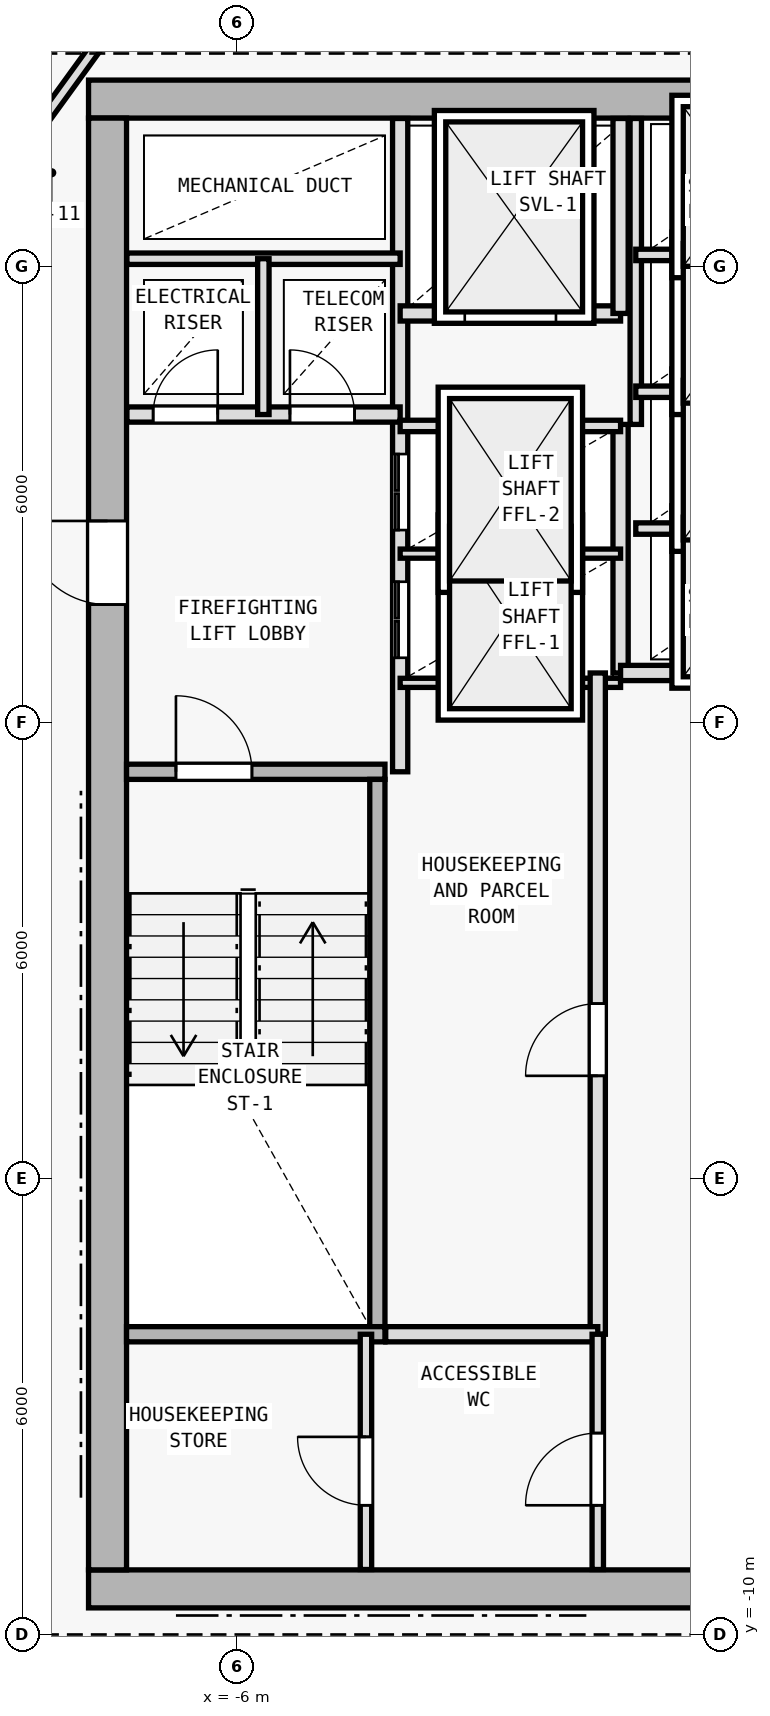
"""IFC4 building model, lengths in metres.
Left out: names, types, materials, properties, quantities, classifications, styles, units other than length and angle.
Written with IfcOpenShell. Run it as: python <this file> out.ifc"""

import sys

from ifc_helpers import new_model, si_unit, direction, frame, frame_2d, origin, origin_2d, place, context, subcontext, project, spatial, rectangle, i_section, extrude, element, fill, save


model = new_model("IFC4")
c1 = context("Model", 3, precision=1e-05, world=origin(), true_north=direction((0.0, 1.0)))
c2 = subcontext(c1, "Body", "Model", "MODEL_VIEW")
j1 = project(units=[si_unit("LENGTHUNIT", "METRE"), si_unit("PLANEANGLEUNIT", "RADIAN")], contexts=[c1])
p1 = place(None, origin())
s1 = spatial("IfcSite", under=j1, at=p1, CompositionType="ELEMENT")
p2 = place(p1, origin())
s2 = spatial("IfcBuilding", under=s1, at=p2, CompositionType="ELEMENT")
p3 = place(p2, frame((0.0, 0.0, 272.4)))
s3 = spatial("IfcBuildingStorey", under=s2, at=p3, CompositionType="ELEMENT", Elevation=272.4)
for number, where, z_axis, x_axis in (
    (1, (-7.7, -9.4, 0.0), (0.0, 0.0, 1.0), (1.0, 0.0, 0.0)),
    (2, (-7.7, 10.2, 0.0), (0.0, 0.0, 1.0), (1.0, 0.0, 0.0)),
    (3, (0.0, -9.4, 0.0), (0.0, 0.0, 1.0), (1.0, 0.0, 0.0)),
    (4, (-7.7, 2.0, 0.0), (0.0, 0.0, 1.0), (1.0, 0.0, 0.0)),
):
    element("IfcColumn", number, at=place(p3, frame(where, z_axis=z_axis, x_axis=x_axis)), inside=s3, PredefinedType="COLUMN", context=c2, shape_type="SweptSolid", body=[
        extrude(i_section(OverallWidth=0.374, OverallDepth=0.372, WebThickness=0.012, FlangeThickness=0.02, FilletRadius=0.015, at=origin_2d()), origin(), (0.0, 0.0, 1.0), 3.6),
    ])
p4 = place(p3, frame((-7.95, -9.4, 0.0), z_axis=(0.0, 0.0, 1.0), x_axis=(1.0, 0.0, 0.0)))
e5 = element("IfcWall", 5, at=p4, inside=s3, PredefinedType="SHEAR", context=c2, shape_type="SweptSolid", body=[
    extrude(rectangle(XDim=15.9, YDim=0.5, at=frame_2d((7.95, 0.0))), origin(), (0.0, 0.0, 1.0), 3.35),
])
p5 = place(p4, frame((9.6, 0.0, 0.0)))
e6 = element("IfcOpeningElement", 6, at=p5, cuts=e5, PredefinedType="OPENING", context=c2, shape_type="SweptSolid", body=[
    extrude(rectangle(XDim=1.5, YDim=2.2, at=frame_2d((0.75, 1.1))), frame((0.0, 0.26, 0.0), z_axis=(0.0, -1.0, 0.0), x_axis=(1.0, 0.0, 0.0)), (0.0, 0.0, 1.0), 0.52),
])
p6 = place(p3, frame((7.95, 10.2, 0.0), z_axis=(0.0, 0.0, 1.0), x_axis=(-1.0, 0.0, 0.0)))
e7 = element("IfcWall", 7, at=p6, inside=s3, PredefinedType="SHEAR", context=c2, shape_type="SweptSolid", body=[
    extrude(rectangle(XDim=15.9, YDim=0.5, at=frame_2d((7.95, 0.0))), origin(), (0.0, 0.0, 1.0), 3.35),
])
p7 = place(p6, frame((4.4, 0.0, 0.0)))
e8 = element("IfcOpeningElement", 8, at=p7, cuts=e7, PredefinedType="OPENING", context=c2, shape_type="SweptSolid", body=[
    extrude(rectangle(XDim=1.1, YDim=2.15, at=frame_2d((0.55, 1.075))), frame((0.0, 0.26, 0.0), z_axis=(0.0, -1.0, 0.0), x_axis=(1.0, 0.0, 0.0)), (0.0, 0.0, 1.0), 0.52),
])
p8 = place(p3, frame((-7.7, -9.15, 0.0), z_axis=(0.0, 0.0, 1.0), x_axis=(0.0, 1.0, 0.0)))
e9 = element("IfcWall", 9, at=p8, inside=s3, PredefinedType="SHEAR", context=c2, shape_type="SweptSolid", body=[
    extrude(rectangle(XDim=19.1, YDim=0.5, at=frame_2d((9.55, 0.0))), origin(), (0.0, 0.0, 1.0), 3.35),
])
p9 = place(p8, frame((12.7, 0.0, 0.0)))
e10 = element("IfcOpeningElement", 10, at=p9, cuts=e9, PredefinedType="OPENING", context=c2, shape_type="SweptSolid", body=[
    extrude(rectangle(XDim=1.1, YDim=2.15, at=frame_2d((0.55, 1.075))), frame((0.0, 0.26, 0.0), z_axis=(0.0, -1.0, 0.0), x_axis=(1.0, 0.0, 0.0)), (0.0, 0.0, 1.0), 0.52),
])
p10 = place(p3, frame((-7.45, 1.35, 0.0), z_axis=(0.0, 0.0, 1.0), x_axis=(1.0, 0.0, 0.0)))
e11 = element("IfcWall", 11, at=p10, inside=s3, PredefinedType="SOLIDWALL", context=c2, shape_type="SweptSolid", body=[
    extrude(rectangle(XDim=3.4, YDim=0.2, at=frame_2d((1.7, 0.0))), origin(), (0.0, 0.0, 1.0), 3.35),
])
p11 = place(p10, frame((0.65, 0.0, 0.0)))
e12 = element("IfcOpeningElement", 12, at=p11, cuts=e11, PredefinedType="OPENING", context=c2, shape_type="SweptSolid", body=[
    extrude(rectangle(XDim=1.0, YDim=2.15, at=frame_2d((0.5, 1.075))), frame((0.0, 0.11, 0.0), z_axis=(0.0, -1.0, 0.0), x_axis=(1.0, 0.0, 0.0)), (0.0, 0.0, 1.0), 0.22),
])
p12 = place(p3, frame((-4.15, -5.95, 0.0), z_axis=(0.0, 0.0, 1.0), x_axis=(0.0, 1.0, 0.0)))
e13 = element("IfcWall", 13, at=p12, inside=s3, PredefinedType="SOLIDWALL", context=c2, shape_type="SweptSolid", body=[
    extrude(rectangle(XDim=7.2, YDim=0.2, at=frame_2d((3.6, 0.0))), origin(), (0.0, 0.0, 1.0), 3.35),
])
p13 = place(p3, frame((-3.85, 1.35, 0.0), z_axis=(0.0, 0.0, 1.0), x_axis=(0.0, 1.0, 0.0)))
e14 = element("IfcWall", 14, at=p13, inside=s3, PredefinedType="SOLIDWALL", context=c2, shape_type="SweptSolid", body=[
    extrude(rectangle(XDim=8.595, YDim=0.2, at=frame_2d((4.297, 0.0))), origin(), (0.0, 0.0, 1.0), 3.35),
])
p14 = place(p13, frame((1.5, 0.0, 0.0)))
e15 = element("IfcOpeningElement", 15, at=p14, cuts=e14, PredefinedType="OPENING", context=c2, shape_type="SweptSolid", body=[
    extrude(rectangle(XDim=1.0, YDim=2.15, at=frame_2d((0.5, 1.075))), frame((0.0, 0.11, 0.0), z_axis=(0.0, -1.0, 0.0), x_axis=(1.0, 0.0, 0.0)), (0.0, 0.0, 1.0), 0.22),
])
p15 = place(p13, frame((3.18, 0.0, 0.0)))
e16 = element("IfcOpeningElement", 16, at=p15, cuts=e14, PredefinedType="OPENING", context=c2, shape_type="SweptSolid", body=[
    extrude(rectangle(XDim=1.0, YDim=2.15, at=frame_2d((0.5, 1.075))), frame((0.0, 0.11, 0.0), z_axis=(0.0, -1.0, 0.0), x_axis=(1.0, 0.0, 0.0)), (0.0, 0.0, 1.0), 0.22),
])
p16 = place(p3, frame((-7.445, 6.05, 0.0), z_axis=(0.0, 0.0, 1.0), x_axis=(1.0, 0.0, 0.0)))
e17 = element("IfcWall", 17, at=p16, inside=s3, PredefinedType="SOLIDWALL", context=c2, shape_type="SweptSolid", body=[
    extrude(rectangle(XDim=3.595, YDim=0.2, at=frame_2d((1.797, 0.0))), origin(), (0.0, 0.0, 1.0), 3.35),
])
p17 = place(p16, frame((0.345, 0.0, 0.0)))
e18 = element("IfcOpeningElement", 18, at=p17, cuts=e17, PredefinedType="OPENING", context=c2, shape_type="SweptSolid", body=[
    extrude(rectangle(XDim=0.85, YDim=2.1, at=frame_2d((0.425, 1.05))), frame((0.0, 0.11, 0.0), z_axis=(0.0, -1.0, 0.0), x_axis=(1.0, 0.0, 0.0)), (0.0, 0.0, 1.0), 0.22),
])
p18 = place(p16, frame((2.145, 0.0, 0.0)))
e19 = element("IfcOpeningElement", 19, at=p18, cuts=e17, PredefinedType="OPENING", context=c2, shape_type="SweptSolid", body=[
    extrude(rectangle(XDim=0.85, YDim=2.1, at=frame_2d((0.425, 1.05))), frame((0.0, 0.11, 0.0), z_axis=(0.0, -1.0, 0.0), x_axis=(1.0, 0.0, 0.0)), (0.0, 0.0, 1.0), 0.22),
])
p19 = place(p3, frame((-7.445, 8.1, 0.0), z_axis=(0.0, 0.0, 1.0), x_axis=(1.0, 0.0, 0.0)))
e20 = element("IfcWall", 20, at=p19, inside=s3, PredefinedType="PARTITIONING", context=c2, shape_type="SweptSolid", body=[
    extrude(rectangle(XDim=3.595, YDim=0.15, at=frame_2d((1.797, 0.0))), origin(), (0.0, 0.0, 1.0), 3.35),
])
p20 = place(p3, frame((-5.65, 6.05, 0.0), z_axis=(0.0, 0.0, 1.0), x_axis=(0.0, 1.0, 0.0)))
e21 = element("IfcWall", 21, at=p20, inside=s3, PredefinedType="PARTITIONING", context=c2, shape_type="SweptSolid", body=[
    extrude(rectangle(XDim=2.05, YDim=0.15, at=frame_2d((1.025, 0.0))), origin(), (0.0, 0.0, 1.0), 3.35),
])
p21 = place(p3, frame((-0.95, 2.65, 0.0), z_axis=(0.0, 0.0, 1.0), x_axis=(0.0, 1.0, 0.0)))
e22 = element("IfcWall", 22, at=p21, inside=s3, PredefinedType="SOLIDWALL", context=c2, shape_type="SweptSolid", body=[
    extrude(rectangle(XDim=3.27, YDim=0.2, at=frame_2d((1.635, 0.0))), origin(), (0.0, 0.0, 1.0), 3.35),
])
for number, where, z_axis, x_axis in (
    (23, (-3.85, 2.52, 0.0), (0.0, 0.0, 1.0), (1.0, 0.0, 0.0)),
    (24, (-3.85, 4.22, 0.0), (0.0, 0.0, 1.0), (1.0, 0.0, 0.0)),
):
    element("IfcWall", number, at=place(p3, frame(where, z_axis=z_axis, x_axis=x_axis)), inside=s3, PredefinedType="PARTITIONING", context=c2, shape_type="SweptSolid", body=[
        extrude(rectangle(XDim=2.9, YDim=0.12, at=frame_2d((1.45, 0.0))), origin(), (0.0, 0.0, 1.0), 3.35),
    ])
p22 = place(p3, frame((-3.85, 5.9, 0.0), z_axis=(0.0, 0.0, 1.0), x_axis=(1.0, 0.0, 0.0)))
e25 = element("IfcWall", 25, at=p22, inside=s3, PredefinedType="PARTITIONING", context=c2, shape_type="SweptSolid", body=[
    extrude(rectangle(XDim=2.9, YDim=0.15, at=frame_2d((1.45, 0.0))), origin(), (0.0, 0.0, 1.0), 3.35),
])
p23 = place(p3, frame((-3.85, 7.38, 0.0), z_axis=(0.0, 0.0, 1.0), x_axis=(1.0, 0.0, 0.0)))
e26 = element("IfcWall", 26, at=p23, inside=s3, PredefinedType="SOLIDWALL", context=c2, shape_type="SweptSolid", body=[
    extrude(rectangle(XDim=2.9, YDim=0.2, at=frame_2d((1.45, 0.0))), origin(), (0.0, 0.0, 1.0), 3.35),
])
p24 = place(p23, frame((0.85, 0.0, 0.0)))
e27 = element("IfcOpeningElement", 27, at=p24, cuts=e26, PredefinedType="OPENING", context=c2, shape_type="SweptSolid", body=[
    extrude(rectangle(XDim=1.2, YDim=2.2, at=frame_2d((0.6, 1.1))), frame((0.0, 0.11, 0.0), z_axis=(0.0, -1.0, 0.0), x_axis=(1.0, 0.0, 0.0)), (0.0, 0.0, 1.0), 0.22),
])
p25 = place(p3, frame((-0.95, 7.38, 0.0), z_axis=(0.0, 0.0, 1.0), x_axis=(0.0, 1.0, 0.0)))
e28 = element("IfcWall", 28, at=p25, inside=s3, PredefinedType="SOLIDWALL", context=c2, shape_type="SweptSolid", body=[
    extrude(rectangle(XDim=2.565, YDim=0.2, at=frame_2d((1.283, 0.0))), origin(), (0.0, 0.0, 1.0), 3.35),
])
p26 = place(p3, frame((-1.25, -6.05, 0.0), z_axis=(0.0, 0.0, 1.0), x_axis=(0.0, 1.0, 0.0)))
e29 = element("IfcWall", 29, at=p26, inside=s3, PredefinedType="SOLIDWALL", context=c2, shape_type="SweptSolid", body=[
    extrude(rectangle(XDim=8.7, YDim=0.2, at=frame_2d((4.35, 0.0))), origin(), (0.0, 0.0, 1.0), 3.35),
])
p27 = place(p26, frame((3.4, 0.0, 0.0)))
e30 = element("IfcOpeningElement", 30, at=p27, cuts=e29, PredefinedType="OPENING", context=c2, shape_type="SweptSolid", body=[
    extrude(rectangle(XDim=0.95, YDim=2.1, at=frame_2d((0.475, 1.05))), frame((0.0, 0.11, 0.0), z_axis=(0.0, -1.0, 0.0), x_axis=(1.0, 0.0, 0.0)), (0.0, 0.0, 1.0), 0.22),
])
p28 = place(p3, frame((-0.95, 2.65, 0.0), z_axis=(0.0, 0.0, 1.0), x_axis=(1.0, 0.0, 0.0)))
e31 = element("IfcWall", 31, at=p28, inside=s3, PredefinedType="SOLIDWALL", context=c2, shape_type="SweptSolid", body=[
    extrude(rectangle(XDim=2.9, YDim=0.2, at=frame_2d((1.45, 0.0))), origin(), (0.0, 0.0, 1.0), 3.35),
])
p29 = place(p3, frame((-0.75, 5.92, 0.0), z_axis=(0.0, 0.0, 1.0), x_axis=(0.0, 1.0, 0.0)))
e32 = element("IfcWall", 32, at=p29, inside=s3, PredefinedType="PARTITIONING", context=c2, shape_type="SweptSolid", body=[
    extrude(rectangle(XDim=4.025, YDim=0.15, at=frame_2d((2.013, 0.0))), origin(), (0.0, 0.0, 1.0), 3.35),
])
for number, where, z_axis, x_axis in (
    (33, (-0.75, 4.55, 0.0), (0.0, 0.0, 1.0), (1.0, 0.0, 0.0)),
    (34, (-0.75, 6.35, 0.0), (0.0, 0.0, 1.0), (1.0, 0.0, 0.0)),
    (35, (-0.75, 8.15, 0.0), (0.0, 0.0, 1.0), (1.0, 0.0, 0.0)),
):
    element("IfcWall", number, at=place(p3, frame(where, z_axis=z_axis, x_axis=x_axis)), inside=s3, PredefinedType="PARTITIONING", context=c2, shape_type="SweptSolid", body=[
        extrude(rectangle(XDim=2.7, YDim=0.15, at=frame_2d((1.35, 0.0))), origin(), (0.0, 0.0, 1.0), 3.35),
    ])
p30 = place(p3, frame((-7.45, -6.05, 0.0), z_axis=(0.0, 0.0, 1.0), x_axis=(1.0, 0.0, 0.0)))
e36 = element("IfcWall", 36, at=p30, inside=s3, PredefinedType="SOLIDWALL", context=c2, shape_type="SweptSolid", body=[
    extrude(rectangle(XDim=3.4, YDim=0.2, at=frame_2d((1.7, 0.0))), origin(), (0.0, 0.0, 1.0), 3.35),
])
p31 = place(p3, frame((-4.04, -6.05, 0.0), z_axis=(0.0, 0.0, 1.0), x_axis=(1.0, 0.0, 0.0)))
e37 = element("IfcWall", 37, at=p31, inside=s3, PredefinedType="SOLIDWALL", context=c2, shape_type="SweptSolid", body=[
    extrude(rectangle(XDim=2.79, YDim=0.2, at=frame_2d((1.395, 0.0))), origin(), (0.0, 0.0, 1.0), 3.35),
])
p32 = place(p3, frame((-1.25, -9.145, 0.0), z_axis=(0.0, 0.0, 1.0), x_axis=(0.0, 1.0, 0.0)))
e38 = element("IfcWall", 38, at=p32, inside=s3, PredefinedType="PARTITIONING", context=c2, shape_type="SweptSolid", body=[
    extrude(rectangle(XDim=3.095, YDim=0.15, at=frame_2d((1.547, 0.0))), origin(), (0.0, 0.0, 1.0), 3.35),
])
p33 = place(p32, frame((0.845, 0.0, 0.0)))
e39 = element("IfcOpeningElement", 39, at=p33, cuts=e38, PredefinedType="OPENING", context=c2, shape_type="SweptSolid", body=[
    extrude(rectangle(XDim=0.95, YDim=2.1, at=frame_2d((0.475, 1.05))), frame((0.0, 0.085, 0.0), z_axis=(0.0, -1.0, 0.0), x_axis=(1.0, 0.0, 0.0)), (0.0, 0.0, 1.0), 0.17),
])
p34 = place(p3, frame((-4.3, -9.145, 0.0), z_axis=(0.0, 0.0, 1.0), x_axis=(0.0, 1.0, 0.0)))
e40 = element("IfcWall", 40, at=p34, inside=s3, PredefinedType="PARTITIONING", context=c2, shape_type="SweptSolid", body=[
    extrude(rectangle(XDim=3.095, YDim=0.15, at=frame_2d((1.547, 0.0))), origin(), (0.0, 0.0, 1.0), 3.35),
])
p35 = place(p34, frame((0.845, 0.0, 0.0)))
e41 = element("IfcOpeningElement", 41, at=p35, cuts=e40, PredefinedType="OPENING", context=c2, shape_type="SweptSolid", body=[
    extrude(rectangle(XDim=0.9, YDim=2.1, at=frame_2d((0.45, 1.05))), frame((0.0, 0.085, 0.0), z_axis=(0.0, -1.0, 0.0), x_axis=(1.0, 0.0, 0.0)), (0.0, 0.0, 1.0), 0.17),
])
p36 = place(p3, frame((-9.78, 8.226, 0.0), z_axis=(0.0, 0.0, 1.0), x_axis=(0.586956386413, 0.809618552436, 0.0)))
e42 = element("IfcWall", 42, at=p36, inside=s3, PredefinedType="PARTITIONING", context=c2, shape_type="SweptSolid", body=[
    extrude(rectangle(XDim=5.008, YDim=0.15, at=frame_2d((2.504, 0.0))), origin(), (0.0, 0.0, 1.0), 3.015),
])
p37 = place(p36, frame((1.154, 0.0, 0.0)))
e43 = element("IfcOpeningElement", 43, at=p37, cuts=e42, PredefinedType="OPENING", context=c2, shape_type="SweptSolid", body=[
    extrude(rectangle(XDim=0.9, YDim=2.1, at=frame_2d((0.45, 1.05))), frame((0.0, 0.085, 0.0), z_axis=(0.0, -1.0, 0.0), x_axis=(1.0, 0.0, 0.0)), (0.0, 0.0, 1.0), 0.17),
])
p38 = place(p9, origin())
e44 = element("IfcDoor", 44, at=p38, inside=s3, OperationType="SINGLE_SWING_RIGHT", PredefinedType="DOOR", context=c2, shape_type="SweptSolid", body=[
    extrude(rectangle(XDim=1.1, YDim=2.15, at=frame_2d((0.55, 1.075))), frame((0.0, 0.025, 0.0), z_axis=(0.0, -1.0, 0.0), x_axis=(1.0, 0.0, 0.0)), (0.0, 0.0, 1.0), 0.05),
])
fill(e10, e44)
p39 = place(p11, origin())
e45 = element("IfcDoor", 45, at=p39, inside=s3, OperationType="SINGLE_SWING_LEFT", PredefinedType="DOOR", context=c2, shape_type="SweptSolid", body=[
    extrude(rectangle(XDim=1.0, YDim=2.15, at=frame_2d((0.5, 1.075))), frame((0.0, 0.025, 0.0), z_axis=(0.0, -1.0, 0.0), x_axis=(1.0, 0.0, 0.0)), (0.0, 0.0, 1.0), 0.05),
])
fill(e12, e45)
p40 = place(p17, origin())
e46 = element("IfcDoor", 46, at=p40, inside=s3, OperationType="SINGLE_SWING_RIGHT", PredefinedType="DOOR", context=c2, shape_type="SweptSolid", body=[
    extrude(rectangle(XDim=0.85, YDim=2.1, at=frame_2d((0.425, 1.05))), frame((0.0, 0.025, 0.0), z_axis=(0.0, -1.0, 0.0), x_axis=(1.0, 0.0, 0.0)), (0.0, 0.0, 1.0), 0.05),
])
fill(e18, e46)
p41 = place(p18, origin())
e47 = element("IfcDoor", 47, at=p41, inside=s3, OperationType="SINGLE_SWING_LEFT", PredefinedType="DOOR", context=c2, shape_type="SweptSolid", body=[
    extrude(rectangle(XDim=0.85, YDim=2.1, at=frame_2d((0.425, 1.05))), frame((0.0, 0.025, 0.0), z_axis=(0.0, -1.0, 0.0), x_axis=(1.0, 0.0, 0.0)), (0.0, 0.0, 1.0), 0.05),
])
fill(e19, e47)
p42 = place(p24, origin())
e48 = element("IfcDoor", 48, at=p42, inside=s3, OperationType="DOUBLE_DOOR_SLIDING", PredefinedType="DOOR", context=c2, shape_type="SweptSolid", body=[
    extrude(rectangle(XDim=1.2, YDim=2.2, at=frame_2d((0.6, 1.1))), frame((0.0, 0.025, 0.0), z_axis=(0.0, -1.0, 0.0), x_axis=(1.0, 0.0, 0.0)), (0.0, 0.0, 1.0), 0.05),
])
fill(e27, e48)
p43 = place(p27, origin())
e49 = element("IfcDoor", 49, at=p43, inside=s3, OperationType="SINGLE_SWING_LEFT", PredefinedType="DOOR", context=c2, shape_type="SweptSolid", body=[
    extrude(rectangle(XDim=0.95, YDim=2.1, at=frame_2d((0.475, 1.05))), frame((0.0, 0.025, 0.0), z_axis=(0.0, -1.0, 0.0), x_axis=(1.0, 0.0, 0.0)), (0.0, 0.0, 1.0), 0.05),
])
fill(e30, e49)
p44 = place(p14, origin())
e50 = element("IfcDoor", 50, at=p44, inside=s3, OperationType="DOUBLE_DOOR_SLIDING", PredefinedType="DOOR", context=c2, shape_type="SweptSolid", body=[
    extrude(rectangle(XDim=1.0, YDim=2.15, at=frame_2d((0.5, 1.075))), frame((0.0, 0.025, 0.0), z_axis=(0.0, -1.0, 0.0), x_axis=(1.0, 0.0, 0.0)), (0.0, 0.0, 1.0), 0.05),
])
fill(e15, e50)
p45 = place(p15, origin())
e51 = element("IfcDoor", 51, at=p45, inside=s3, OperationType="DOUBLE_DOOR_SLIDING", PredefinedType="DOOR", context=c2, shape_type="SweptSolid", body=[
    extrude(rectangle(XDim=1.0, YDim=2.15, at=frame_2d((0.5, 1.075))), frame((0.0, 0.025, 0.0), z_axis=(0.0, -1.0, 0.0), x_axis=(1.0, 0.0, 0.0)), (0.0, 0.0, 1.0), 0.05),
])
fill(e16, e51)
p46 = place(p33, origin())
e52 = element("IfcDoor", 52, at=p46, inside=s3, OperationType="SINGLE_SWING_LEFT", PredefinedType="DOOR", context=c2, shape_type="SweptSolid", body=[
    extrude(rectangle(XDim=0.95, YDim=2.1, at=frame_2d((0.475, 1.05))), frame((0.0, 0.025, 0.0), z_axis=(0.0, -1.0, 0.0), x_axis=(1.0, 0.0, 0.0)), (0.0, 0.0, 1.0), 0.05),
])
fill(e39, e52)
p47 = place(p35, origin())
e53 = element("IfcDoor", 53, at=p47, inside=s3, OperationType="SINGLE_SWING_RIGHT", PredefinedType="DOOR", context=c2, shape_type="SweptSolid", body=[
    extrude(rectangle(XDim=0.9, YDim=2.1, at=frame_2d((0.45, 1.05))), frame((0.0, 0.025, 0.0), z_axis=(0.0, -1.0, 0.0), x_axis=(1.0, 0.0, 0.0)), (0.0, 0.0, 1.0), 0.05),
])
fill(e41, e53)
save(model, sys.argv[1])
